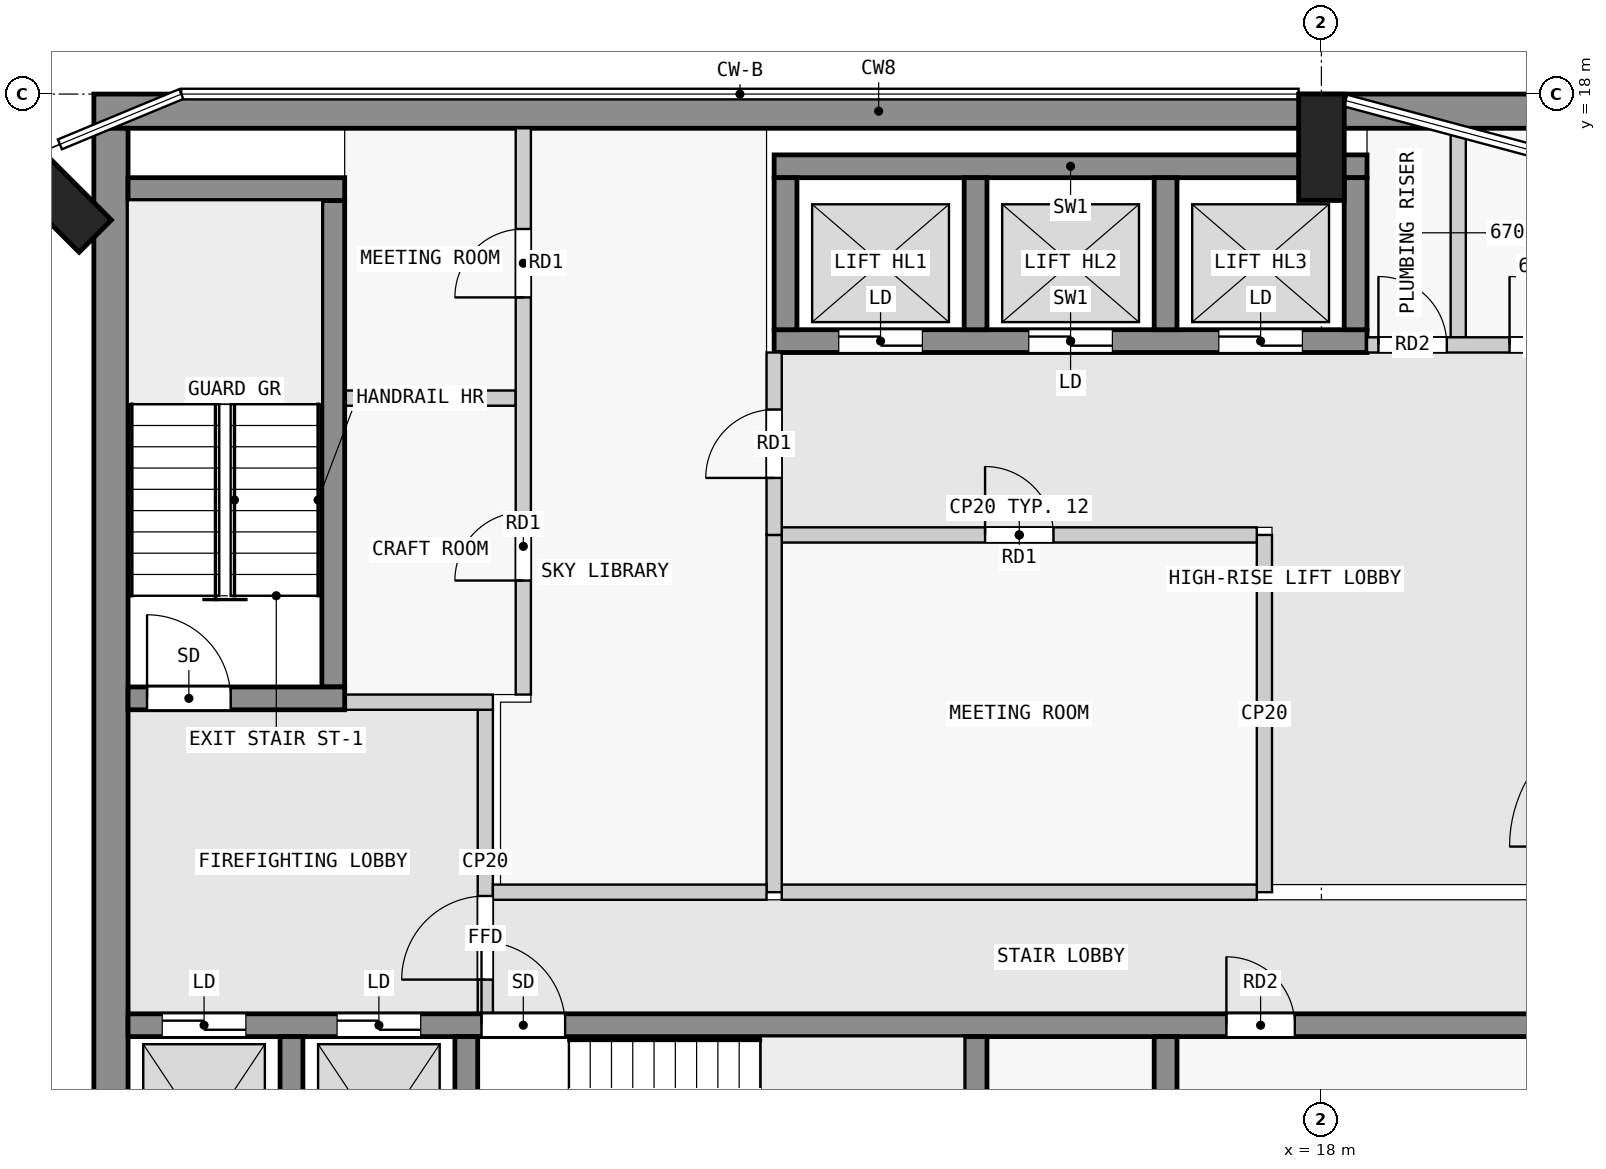
"""IFC4 building model, lengths in metres.
Left out: names, types, materials, properties, quantities, classifications, styles, units other than length and angle.
Written with IfcOpenShell. Run it as: python <this file> out.ifc"""

import sys

from ifc_helpers import new_model, si_unit, direction, frame, frame_2d, origin, origin_2d, place, context, subcontext, project, spatial, rectangle, extrude, element, fill, save


model = new_model("IFC4")
c1 = context("Model", 3, precision=1e-05, world=origin(), true_north=direction((0.0, 1.0)))
c2 = subcontext(c1, "Body", "Model", "MODEL_VIEW")
j1 = project(units=[si_unit("LENGTHUNIT", "METRE"), si_unit("PLANEANGLEUNIT", "RADIAN")], contexts=[c1])
p1 = place(None, origin())
s1 = spatial("IfcSite", under=j1, at=p1, CompositionType="ELEMENT")
p2 = place(p1, origin())
s2 = spatial("IfcBuilding", under=s1, at=p2, CompositionType="ELEMENT")
p3 = place(p2, frame((0.0, 0.0, 256.4)))
s3 = spatial("IfcBuildingStorey", under=s2, at=p3, CompositionType="ELEMENT", Elevation=256.4)
for number, where, z_axis, x_axis in (
    (1, (18.0, 17.3, 0.0), (0.0, 0.0, 1.0), (1.0, 0.0, 0.0)),
    (2, (1.374, 16.626, 0.0), (0.0, 0.0, 1.0), (0.707, 0.707, 0.0)),
):
    element("IfcColumn", number, at=place(p3, frame(where, z_axis=z_axis, x_axis=x_axis)), inside=s3, PredefinedType="COLUMN", context=c2, shape_type="SweptSolid", body=[
        extrude(rectangle(XDim=0.6, YDim=1.4, at=origin_2d()), origin(), (0.0, 0.0, 1.0), 3.5),
    ])
p4 = place(p3, frame((1.85, 17.775, 0.0), z_axis=(0.0, 0.0, 1.0), x_axis=(1.0, 0.0, 0.0)))
e3 = element("IfcWall", 3, at=p4, inside=s3, PredefinedType="SHEAR", context=c2, shape_type="SweptSolid", body=[
    extrude(rectangle(XDim=20.65, YDim=0.45, at=frame_2d((10.325, 0.0))), origin(), (0.0, 0.0, 1.0), 3.25),
])
p5 = place(p3, frame((2.075, 2.5, 0.0), z_axis=(0.0, 0.0, 1.0), x_axis=(0.0, 1.0, 0.0)))
e4 = element("IfcWall", 4, at=p5, inside=s3, PredefinedType="SHEAR", context=c2, shape_type="SweptSolid", body=[
    extrude(rectangle(XDim=15.05, YDim=0.45, at=frame_2d((7.525, 0.0))), origin(), (0.0, 0.0, 1.0), 3.25),
])
for number, where, z_axis, x_axis in (
    (5, (4.45, 2.8, 0.0), (0.0, 0.0, 1.0), (0.0, 1.0, 0.0)),
    (6, (6.75, 2.8, 0.0), (0.0, 0.0, 1.0), (0.0, 1.0, 0.0)),
    (7, (13.45, 2.8, 0.0), (0.0, 0.0, 1.0), (0.0, 1.0, 0.0)),
):
    element("IfcWall", number, at=place(p3, frame(where, z_axis=z_axis, x_axis=x_axis)), inside=s3, PredefinedType="SHEAR", context=c2, shape_type="SweptSolid", body=[
        extrude(rectangle(XDim=2.8, YDim=0.3, at=frame_2d((1.4, 0.0))), origin(), (0.0, 0.0, 1.0), 3.25),
    ])
p6 = place(p3, frame((2.3, 5.75, 0.0), z_axis=(0.0, 0.0, 1.0), x_axis=(1.0, 0.0, 0.0)))
e8 = element("IfcWall", 8, at=p6, inside=s3, PredefinedType="SHEAR", context=c2, shape_type="SweptSolid", body=[
    extrude(rectangle(XDim=18.8, YDim=0.3, at=frame_2d((9.4, 0.0))), origin(), (0.0, 0.0, 1.0), 3.25),
])
p7 = place(p6, frame((4.65, 0.0, 0.0)))
e9 = element("IfcOpeningElement", 9, at=p7, cuts=e8, PredefinedType="OPENING", context=c2, shape_type="SweptSolid", body=[
    extrude(rectangle(XDim=1.1, YDim=2.1, at=frame_2d((0.55, 1.05))), frame((0.0, 0.16, 0.0), z_axis=(0.0, -1.0, 0.0), x_axis=(1.0, 0.0, 0.0)), (0.0, 0.0, 1.0), 0.32),
])
p8 = place(p6, frame((0.45, 0.0, 0.0)))
e10 = element("IfcOpeningElement", 10, at=p8, cuts=e8, PredefinedType="OPENING", context=c2, shape_type="SweptSolid", body=[
    extrude(rectangle(XDim=1.1, YDim=2.1, at=frame_2d((0.55, 1.05))), frame((0.0, 0.16, 0.0), z_axis=(0.0, -1.0, 0.0), x_axis=(1.0, 0.0, 0.0)), (0.0, 0.0, 1.0), 0.32),
])
p9 = place(p6, frame((2.75, 0.0, 0.0)))
e11 = element("IfcOpeningElement", 11, at=p9, cuts=e8, PredefinedType="OPENING", context=c2, shape_type="SweptSolid", body=[
    extrude(rectangle(XDim=1.1, YDim=2.1, at=frame_2d((0.55, 1.05))), frame((0.0, 0.16, 0.0), z_axis=(0.0, -1.0, 0.0), x_axis=(1.0, 0.0, 0.0)), (0.0, 0.0, 1.0), 0.32),
])
p10 = place(p6, frame((14.45, 0.0, 0.0)))
e12 = element("IfcOpeningElement", 12, at=p10, cuts=e8, PredefinedType="OPENING", context=c2, shape_type="SweptSolid", body=[
    extrude(rectangle(XDim=0.9, YDim=2.1, at=frame_2d((0.45, 1.05))), frame((0.0, 0.16, 0.0), z_axis=(0.0, -1.0, 0.0), x_axis=(1.0, 0.0, 0.0)), (0.0, 0.0, 1.0), 0.32),
])
p11 = place(p3, frame((2.3, 10.05, 0.0), z_axis=(0.0, 0.0, 1.0), x_axis=(1.0, 0.0, 0.0)))
e13 = element("IfcWall", 13, at=p11, inside=s3, PredefinedType="SHEAR", context=c2, shape_type="SweptSolid", body=[
    extrude(rectangle(XDim=2.85, YDim=0.3, at=frame_2d((1.425, 0.0))), origin(), (0.0, 0.0, 1.0), 3.25),
])
p12 = place(p11, frame((0.25, 0.0, 0.0)))
e14 = element("IfcOpeningElement", 14, at=p12, cuts=e13, PredefinedType="OPENING", context=c2, shape_type="SweptSolid", body=[
    extrude(rectangle(XDim=1.1, YDim=2.1, at=frame_2d((0.55, 1.05))), frame((0.0, 0.16, 0.0), z_axis=(0.0, -1.0, 0.0), x_axis=(1.0, 0.0, 0.0)), (0.0, 0.0, 1.0), 0.32),
])
p13 = place(p3, frame((5.0, 10.2, 0.0), z_axis=(0.0, 0.0, 1.0), x_axis=(0.0, 1.0, 0.0)))
e15 = element("IfcWall", 15, at=p13, inside=s3, PredefinedType="SHEAR", context=c2, shape_type="SweptSolid", body=[
    extrude(rectangle(XDim=6.4, YDim=0.3, at=frame_2d((3.2, 0.0))), origin(), (0.0, 0.0, 1.0), 3.25),
])
p14 = place(p3, frame((2.3, 16.75, 0.0), z_axis=(0.0, 0.0, 1.0), x_axis=(1.0, 0.0, 0.0)))
e16 = element("IfcWall", 16, at=p14, inside=s3, PredefinedType="SHEAR", context=c2, shape_type="SweptSolid", body=[
    extrude(rectangle(XDim=2.85, YDim=0.3, at=frame_2d((1.425, 0.0))), origin(), (0.0, 0.0, 1.0), 3.25),
])
p15 = place(p3, frame((10.8, 17.05, 0.0), z_axis=(0.0, 0.0, 1.0), x_axis=(1.0, 0.0, 0.0)))
e17 = element("IfcWall", 17, at=p15, inside=s3, PredefinedType="SHEAR", context=c2, shape_type="SweptSolid", body=[
    extrude(rectangle(XDim=7.8, YDim=0.3, at=frame_2d((3.9, 0.0))), origin(), (0.0, 0.0, 1.0), 3.25),
])
p16 = place(p3, frame((10.8, 14.75, 0.0), z_axis=(0.0, 0.0, 1.0), x_axis=(1.0, 0.0, 0.0)))
e18 = element("IfcWall", 18, at=p16, inside=s3, PredefinedType="SHEAR", context=c2, shape_type="SweptSolid", body=[
    extrude(rectangle(XDim=7.8, YDim=0.3, at=frame_2d((3.9, 0.0))), origin(), (0.0, 0.0, 1.0), 3.25),
])
p17 = place(p16, frame((0.85, 0.0, 0.0)))
e19 = element("IfcOpeningElement", 19, at=p17, cuts=e18, PredefinedType="OPENING", context=c2, shape_type="SweptSolid", body=[
    extrude(rectangle(XDim=1.1, YDim=2.1, at=frame_2d((0.55, 1.05))), frame((0.0, 0.16, 0.0), z_axis=(0.0, -1.0, 0.0), x_axis=(1.0, 0.0, 0.0)), (0.0, 0.0, 1.0), 0.32),
])
p18 = place(p16, frame((3.35, 0.0, 0.0)))
e20 = element("IfcOpeningElement", 20, at=p18, cuts=e18, PredefinedType="OPENING", context=c2, shape_type="SweptSolid", body=[
    extrude(rectangle(XDim=1.1, YDim=2.1, at=frame_2d((0.55, 1.05))), frame((0.0, 0.16, 0.0), z_axis=(0.0, -1.0, 0.0), x_axis=(1.0, 0.0, 0.0)), (0.0, 0.0, 1.0), 0.32),
])
p19 = place(p16, frame((5.85, 0.0, 0.0)))
e21 = element("IfcOpeningElement", 21, at=p19, cuts=e18, PredefinedType="OPENING", context=c2, shape_type="SweptSolid", body=[
    extrude(rectangle(XDim=1.1, YDim=2.1, at=frame_2d((0.55, 1.05))), frame((0.0, 0.16, 0.0), z_axis=(0.0, -1.0, 0.0), x_axis=(1.0, 0.0, 0.0)), (0.0, 0.0, 1.0), 0.32),
])
for number, where, z_axis, x_axis in (
    (22, (10.95, 14.9, 0.0), (0.0, 0.0, 1.0), (0.0, 1.0, 0.0)),
    (23, (13.45, 14.9, 0.0), (0.0, 0.0, 1.0), (0.0, 1.0, 0.0)),
    (24, (15.95, 14.9, 0.0), (0.0, 0.0, 1.0), (0.0, 1.0, 0.0)),
    (25, (18.45, 14.9, 0.0), (0.0, 0.0, 1.0), (0.0, 1.0, 0.0)),
):
    element("IfcWall", number, at=place(p3, frame(where, z_axis=z_axis, x_axis=x_axis)), inside=s3, PredefinedType="SHEAR", context=c2, shape_type="SweptSolid", body=[
        extrude(rectangle(XDim=2.0, YDim=0.3, at=frame_2d((1.0, 0.0))), origin(), (0.0, 0.0, 1.0), 3.25),
    ])
p20 = place(p3, frame((7.0, 5.9, 0.0), z_axis=(0.0, 0.0, 1.0), x_axis=(0.0, 1.0, 0.0)))
e26 = element("IfcWall", 26, at=p20, inside=s3, PredefinedType="PARTITIONING", context=c2, shape_type="SweptSolid", body=[
    extrude(rectangle(XDim=4.0, YDim=0.2, at=frame_2d((2.0, 0.0))), origin(), (0.0, 0.0, 1.0), 3.25),
])
p21 = place(p20, frame((0.45, 0.0, 0.0)))
e27 = element("IfcOpeningElement", 27, at=p21, cuts=e26, PredefinedType="OPENING", context=c2, shape_type="SweptSolid", body=[
    extrude(rectangle(XDim=1.1, YDim=2.1, at=frame_2d((0.55, 1.05))), frame((0.0, 0.11, 0.0), z_axis=(0.0, -1.0, 0.0), x_axis=(1.0, 0.0, 0.0)), (0.0, 0.0, 1.0), 0.22),
])
p22 = place(p3, frame((5.15, 10.0, 0.0), z_axis=(0.0, 0.0, 1.0), x_axis=(1.0, 0.0, 0.0)))
e28 = element("IfcWall", 28, at=p22, inside=s3, PredefinedType="PARTITIONING", context=c2, shape_type="SweptSolid", body=[
    extrude(rectangle(XDim=1.95, YDim=0.2, at=frame_2d((0.975, 0.0))), origin(), (0.0, 0.0, 1.0), 3.25),
])
p23 = place(p3, frame((7.1, 7.5, 0.0), z_axis=(0.0, 0.0, 1.0), x_axis=(1.0, 0.0, 0.0)))
e29 = element("IfcWall", 29, at=p23, inside=s3, PredefinedType="PARTITIONING", context=c2, shape_type="SweptSolid", body=[
    extrude(rectangle(XDim=3.6, YDim=0.2, at=frame_2d((1.8, 0.0))), origin(), (0.0, 0.0, 1.0), 3.25),
])
p24 = place(p3, frame((10.8, 12.2, 0.0), z_axis=(0.0, 0.0, 1.0), x_axis=(0.0, 1.0, 0.0)))
e30 = element("IfcWall", 30, at=p24, inside=s3, PredefinedType="PARTITIONING", context=c2, shape_type="SweptSolid", body=[
    extrude(rectangle(XDim=2.4, YDim=0.2, at=frame_2d((1.2, 0.0))), origin(), (0.0, 0.0, 1.0), 3.25),
])
p25 = place(p24, frame((0.75, 0.0, 0.0)))
e31 = element("IfcOpeningElement", 31, at=p25, cuts=e30, PredefinedType="OPENING", context=c2, shape_type="SweptSolid", body=[
    extrude(rectangle(XDim=0.9, YDim=2.1, at=frame_2d((0.45, 1.05))), frame((0.0, 0.11, 0.0), z_axis=(0.0, -1.0, 0.0), x_axis=(1.0, 0.0, 0.0)), (0.0, 0.0, 1.0), 0.22),
])
p26 = place(p3, frame((10.8, 7.5, 0.0), z_axis=(0.0, 0.0, 1.0), x_axis=(0.0, 1.0, 0.0)))
e32 = element("IfcWall", 32, at=p26, inside=s3, PredefinedType="PARTITIONING", context=c2, shape_type="SweptSolid", body=[
    extrude(rectangle(XDim=4.7, YDim=0.2, at=frame_2d((2.35, 0.0))), origin(), (0.0, 0.0, 1.0), 3.25),
])
p27 = place(p3, frame((10.9, 7.5, 0.0), z_axis=(0.0, 0.0, 1.0), x_axis=(1.0, 0.0, 0.0)))
e33 = element("IfcWall", 33, at=p27, inside=s3, PredefinedType="PARTITIONING", context=c2, shape_type="SweptSolid", body=[
    extrude(rectangle(XDim=6.25, YDim=0.2, at=frame_2d((3.125, 0.0))), origin(), (0.0, 0.0, 1.0), 3.25),
])
p28 = place(p3, frame((17.25, 7.5, 0.0), z_axis=(0.0, 0.0, 1.0), x_axis=(0.0, 1.0, 0.0)))
e34 = element("IfcWall", 34, at=p28, inside=s3, PredefinedType="PARTITIONING", context=c2, shape_type="SweptSolid", body=[
    extrude(rectangle(XDim=4.7, YDim=0.2, at=frame_2d((2.35, 0.0))), origin(), (0.0, 0.0, 1.0), 3.25),
])
p29 = place(p3, frame((10.9, 12.2, 0.0), z_axis=(0.0, 0.0, 1.0), x_axis=(1.0, 0.0, 0.0)))
e35 = element("IfcWall", 35, at=p29, inside=s3, PredefinedType="PARTITIONING", context=c2, shape_type="SweptSolid", body=[
    extrude(rectangle(XDim=6.25, YDim=0.2, at=frame_2d((3.125, 0.0))), origin(), (0.0, 0.0, 1.0), 3.25),
])
p30 = place(p29, frame((2.675, 0.0, 0.0)))
e36 = element("IfcOpeningElement", 36, at=p30, cuts=e35, PredefinedType="OPENING", context=c2, shape_type="SweptSolid", body=[
    extrude(rectangle(XDim=0.9, YDim=2.1, at=frame_2d((0.45, 1.05))), frame((0.0, 0.11, 0.0), z_axis=(0.0, -1.0, 0.0), x_axis=(1.0, 0.0, 0.0)), (0.0, 0.0, 1.0), 0.22),
])
p31 = place(p3, frame((7.5, 10.1, 0.0), z_axis=(0.0, 0.0, 1.0), x_axis=(0.0, 1.0, 0.0)))
e37 = element("IfcWall", 37, at=p31, inside=s3, PredefinedType="PARTITIONING", context=c2, shape_type="SweptSolid", body=[
    extrude(rectangle(XDim=7.45, YDim=0.2, at=frame_2d((3.725, 0.0))), origin(), (0.0, 0.0, 1.0), 3.25),
])
p32 = place(p31, frame((1.5, 0.0, 0.0)))
e38 = element("IfcOpeningElement", 38, at=p32, cuts=e37, PredefinedType="OPENING", context=c2, shape_type="SweptSolid", body=[
    extrude(rectangle(XDim=0.9, YDim=2.1, at=frame_2d((0.45, 1.05))), frame((0.0, 0.11, 0.0), z_axis=(0.0, -1.0, 0.0), x_axis=(1.0, 0.0, 0.0)), (0.0, 0.0, 1.0), 0.22),
])
p33 = place(p31, frame((5.225, 0.0, 0.0)))
e39 = element("IfcOpeningElement", 39, at=p33, cuts=e37, PredefinedType="OPENING", context=c2, shape_type="SweptSolid", body=[
    extrude(rectangle(XDim=0.9, YDim=2.1, at=frame_2d((0.45, 1.05))), frame((0.0, 0.11, 0.0), z_axis=(0.0, -1.0, 0.0), x_axis=(1.0, 0.0, 0.0)), (0.0, 0.0, 1.0), 0.22),
])
p34 = place(p3, frame((5.15, 14.0, 0.0), z_axis=(0.0, 0.0, 1.0), x_axis=(1.0, 0.0, 0.0)))
e40 = element("IfcWall", 40, at=p34, inside=s3, PredefinedType="PARTITIONING", context=c2, shape_type="SweptSolid", body=[
    extrude(rectangle(XDim=2.25, YDim=0.2, at=frame_2d((1.125, 0.0))), origin(), (0.0, 0.0, 1.0), 3.25),
])
p35 = place(p3, frame((18.6, 14.7, 0.0), z_axis=(0.0, 0.0, 1.0), x_axis=(1.0, 0.0, 0.0)))
e41 = element("IfcWall", 41, at=p35, inside=s3, PredefinedType="PARTITIONING", context=c2, shape_type="SweptSolid", body=[
    extrude(rectangle(XDim=3.45, YDim=0.2, at=frame_2d((1.725, 0.0))), origin(), (0.0, 0.0, 1.0), 3.25),
])
p36 = place(p35, frame((0.15, 0.0, 0.0)))
e42 = element("IfcOpeningElement", 42, at=p36, cuts=e41, PredefinedType="OPENING", context=c2, shape_type="SweptSolid", body=[
    extrude(rectangle(XDim=0.9, YDim=2.1, at=frame_2d((0.45, 1.05))), frame((0.0, 0.11, 0.0), z_axis=(0.0, -1.0, 0.0), x_axis=(1.0, 0.0, 0.0)), (0.0, 0.0, 1.0), 0.22),
])
p37 = place(p35, frame((1.875, 0.0, 0.0)))
e43 = element("IfcOpeningElement", 43, at=p37, cuts=e41, PredefinedType="OPENING", context=c2, shape_type="SweptSolid", body=[
    extrude(rectangle(XDim=0.9, YDim=2.1, at=frame_2d((0.45, 1.05))), frame((0.0, 0.11, 0.0), z_axis=(0.0, -1.0, 0.0), x_axis=(1.0, 0.0, 0.0)), (0.0, 0.0, 1.0), 0.22),
])
p38 = place(p3, frame((19.8, 14.8, 0.0), z_axis=(0.0, 0.0, 1.0), x_axis=(0.0, 1.0, 0.0)))
e44 = element("IfcWall", 44, at=p38, inside=s3, PredefinedType="PARTITIONING", context=c2, shape_type="SweptSolid", body=[
    extrude(rectangle(XDim=2.75, YDim=0.2, at=frame_2d((1.375, 0.0))), origin(), (0.0, 0.0, 1.0), 3.25),
])
p39 = place(p3, frame((15.95, 2.8, 0.0), z_axis=(0.0, 0.0, 1.0), x_axis=(0.0, 1.0, 0.0)))
e45 = element("IfcWall", 45, at=p39, inside=s3, PredefinedType="SHEAR", context=c2, shape_type="SweptSolid", body=[
    extrude(rectangle(XDim=2.8, YDim=0.3, at=frame_2d((1.4, 0.0))), origin(), (0.0, 0.0, 1.0), 3.25),
])
p40 = place(p21, origin())
e46 = element("IfcDoor", 46, at=p40, inside=s3, OperationType="SINGLE_SWING_LEFT", PredefinedType="DOOR", context=c2, shape_type="SweptSolid", body=[
    extrude(rectangle(XDim=1.1, YDim=2.1, at=frame_2d((0.55, 1.05))), frame((0.0, 0.025, 0.0), z_axis=(0.0, -1.0, 0.0), x_axis=(1.0, 0.0, 0.0)), (0.0, 0.0, 1.0), 0.05),
])
fill(e27, e46)
p41 = place(p12, origin())
e47 = element("IfcDoor", 47, at=p41, inside=s3, OperationType="SINGLE_SWING_RIGHT", PredefinedType="DOOR", context=c2, shape_type="SweptSolid", body=[
    extrude(rectangle(XDim=1.1, YDim=2.1, at=frame_2d((0.55, 1.05))), frame((0.0, 0.025, 0.0), z_axis=(0.0, -1.0, 0.0), x_axis=(1.0, 0.0, 0.0)), (0.0, 0.0, 1.0), 0.05),
])
fill(e14, e47)
p42 = place(p25, origin())
e48 = element("IfcDoor", 48, at=p42, inside=s3, OperationType="SINGLE_SWING_LEFT", PredefinedType="DOOR", context=c2, shape_type="SweptSolid", body=[
    extrude(rectangle(XDim=0.9, YDim=2.1, at=frame_2d((0.45, 1.05))), frame((0.0, 0.025, 0.0), z_axis=(0.0, -1.0, 0.0), x_axis=(1.0, 0.0, 0.0)), (0.0, 0.0, 1.0), 0.05),
])
fill(e31, e48)
p43 = place(p30, origin())
e49 = element("IfcDoor", 49, at=p43, inside=s3, OperationType="SINGLE_SWING_LEFT", PredefinedType="DOOR", context=c2, shape_type="SweptSolid", body=[
    extrude(rectangle(XDim=0.9, YDim=2.1, at=frame_2d((0.45, 1.05))), frame((0.0, 0.025, 0.0), z_axis=(0.0, -1.0, 0.0), x_axis=(1.0, 0.0, 0.0)), (0.0, 0.0, 1.0), 0.05),
])
fill(e36, e49)
p44 = place(p7, origin())
e50 = element("IfcDoor", 50, at=p44, inside=s3, OperationType="SINGLE_SWING_LEFT", PredefinedType="DOOR", context=c2, shape_type="SweptSolid", body=[
    extrude(rectangle(XDim=1.1, YDim=2.1, at=frame_2d((0.55, 1.05))), frame((0.0, 0.025, 0.0), z_axis=(0.0, -1.0, 0.0), x_axis=(1.0, 0.0, 0.0)), (0.0, 0.0, 1.0), 0.05),
])
fill(e9, e50)
p45 = place(p8, origin())
e51 = element("IfcDoor", 51, at=p45, inside=s3, OperationType="DOUBLE_DOOR_SLIDING", PredefinedType="DOOR", context=c2, shape_type="SweptSolid", body=[
    extrude(rectangle(XDim=1.1, YDim=2.1, at=frame_2d((0.55, 1.05))), frame((0.0, 0.025, 0.0), z_axis=(0.0, -1.0, 0.0), x_axis=(1.0, 0.0, 0.0)), (0.0, 0.0, 1.0), 0.05),
])
fill(e10, e51)
p46 = place(p9, origin())
e52 = element("IfcDoor", 52, at=p46, inside=s3, OperationType="DOUBLE_DOOR_SLIDING", PredefinedType="DOOR", context=c2, shape_type="SweptSolid", body=[
    extrude(rectangle(XDim=1.1, YDim=2.1, at=frame_2d((0.55, 1.05))), frame((0.0, 0.025, 0.0), z_axis=(0.0, -1.0, 0.0), x_axis=(1.0, 0.0, 0.0)), (0.0, 0.0, 1.0), 0.05),
])
fill(e11, e52)
p47 = place(p17, origin())
e53 = element("IfcDoor", 53, at=p47, inside=s3, OperationType="DOUBLE_DOOR_SLIDING", PredefinedType="DOOR", context=c2, shape_type="SweptSolid", body=[
    extrude(rectangle(XDim=1.1, YDim=2.1, at=frame_2d((0.55, 1.05))), frame((0.0, 0.025, 0.0), z_axis=(0.0, -1.0, 0.0), x_axis=(1.0, 0.0, 0.0)), (0.0, 0.0, 1.0), 0.05),
])
fill(e19, e53)
p48 = place(p18, origin())
e54 = element("IfcDoor", 54, at=p48, inside=s3, OperationType="DOUBLE_DOOR_SLIDING", PredefinedType="DOOR", context=c2, shape_type="SweptSolid", body=[
    extrude(rectangle(XDim=1.1, YDim=2.1, at=frame_2d((0.55, 1.05))), frame((0.0, 0.025, 0.0), z_axis=(0.0, -1.0, 0.0), x_axis=(1.0, 0.0, 0.0)), (0.0, 0.0, 1.0), 0.05),
])
fill(e20, e54)
p49 = place(p19, origin())
e55 = element("IfcDoor", 55, at=p49, inside=s3, OperationType="DOUBLE_DOOR_SLIDING", PredefinedType="DOOR", context=c2, shape_type="SweptSolid", body=[
    extrude(rectangle(XDim=1.1, YDim=2.1, at=frame_2d((0.55, 1.05))), frame((0.0, 0.025, 0.0), z_axis=(0.0, -1.0, 0.0), x_axis=(1.0, 0.0, 0.0)), (0.0, 0.0, 1.0), 0.05),
])
fill(e21, e55)
p50 = place(p32, origin())
e56 = element("IfcDoor", 56, at=p50, inside=s3, OperationType="SINGLE_SWING_RIGHT", PredefinedType="DOOR", context=c2, shape_type="SweptSolid", body=[
    extrude(rectangle(XDim=0.9, YDim=2.1, at=frame_2d((0.45, 1.05))), frame((0.0, 0.025, 0.0), z_axis=(0.0, -1.0, 0.0), x_axis=(1.0, 0.0, 0.0)), (0.0, 0.0, 1.0), 0.05),
])
fill(e38, e56)
p51 = place(p33, origin())
e57 = element("IfcDoor", 57, at=p51, inside=s3, OperationType="SINGLE_SWING_RIGHT", PredefinedType="DOOR", context=c2, shape_type="SweptSolid", body=[
    extrude(rectangle(XDim=0.9, YDim=2.1, at=frame_2d((0.45, 1.05))), frame((0.0, 0.025, 0.0), z_axis=(0.0, -1.0, 0.0), x_axis=(1.0, 0.0, 0.0)), (0.0, 0.0, 1.0), 0.05),
])
fill(e39, e57)
p52 = place(p36, origin())
e58 = element("IfcDoor", 58, at=p52, inside=s3, OperationType="SINGLE_SWING_LEFT", PredefinedType="DOOR", context=c2, shape_type="SweptSolid", body=[
    extrude(rectangle(XDim=0.9, YDim=2.1, at=frame_2d((0.45, 1.05))), frame((0.0, 0.025, 0.0), z_axis=(0.0, -1.0, 0.0), x_axis=(1.0, 0.0, 0.0)), (0.0, 0.0, 1.0), 0.05),
])
fill(e42, e58)
p53 = place(p37, origin())
e59 = element("IfcDoor", 59, at=p53, inside=s3, OperationType="SINGLE_SWING_LEFT", PredefinedType="DOOR", context=c2, shape_type="SweptSolid", body=[
    extrude(rectangle(XDim=0.9, YDim=2.1, at=frame_2d((0.45, 1.05))), frame((0.0, 0.025, 0.0), z_axis=(0.0, -1.0, 0.0), x_axis=(1.0, 0.0, 0.0)), (0.0, 0.0, 1.0), 0.05),
])
fill(e43, e59)
p54 = place(p10, origin())
e60 = element("IfcDoor", 60, at=p54, inside=s3, OperationType="SINGLE_SWING_LEFT", PredefinedType="DOOR", context=c2, shape_type="SweptSolid", body=[
    extrude(rectangle(XDim=0.9, YDim=2.1, at=frame_2d((0.45, 1.05))), frame((0.0, 0.025, 0.0), z_axis=(0.0, -1.0, 0.0), x_axis=(1.0, 0.0, 0.0)), (0.0, 0.0, 1.0), 0.05),
])
fill(e12, e60)
save(model, sys.argv[1])
